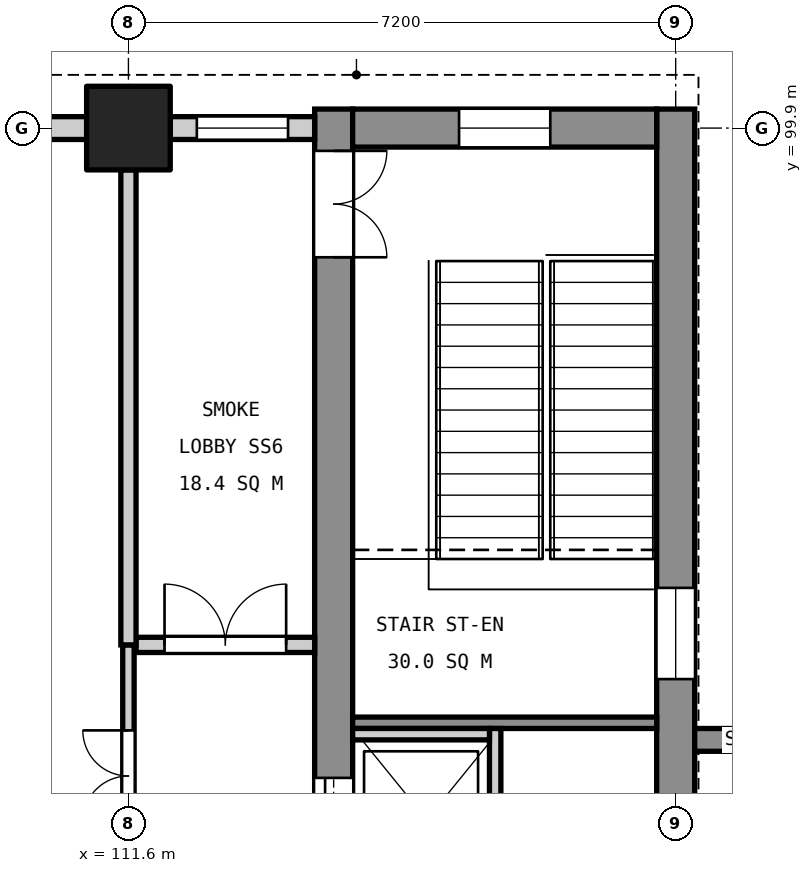
"""IFC4 building model, lengths in metres.
Left out: names, types, materials, properties, quantities, classifications, styles, units other than length and angle.
Written with IfcOpenShell. Run it as: python <this file> out.ifc"""

import sys

from ifc_helpers import new_model, si_unit, direction, frame, frame_2d, origin, origin_2d, place, context, subcontext, project, spatial, rectangle, extrude, element, fill, save


model = new_model("IFC4")
c1 = context("Model", 3, precision=1e-05, world=origin(), true_north=direction((0.0, 1.0)))
c2 = subcontext(c1, "Body", "Model", "MODEL_VIEW")
j1 = project(units=[si_unit("LENGTHUNIT", "METRE"), si_unit("PLANEANGLEUNIT", "RADIAN")], contexts=[c1])
p1 = place(None, origin())
s1 = spatial("IfcSite", under=j1, at=p1, CompositionType="ELEMENT")
p2 = place(p1, origin())
s2 = spatial("IfcBuilding", under=s1, at=p2, CompositionType="ELEMENT")
p3 = place(p2, frame((0.0, 0.0, 16.8)))
s3 = spatial("IfcBuildingStorey", under=s2, at=p3, CompositionType="ELEMENT", Elevation=16.8)
p4 = place(p3, frame((111.6, 99.9, 0.0), z_axis=(0.0, 0.0, 1.0), x_axis=(1.0, 0.0, 0.0)))
e1 = element("IfcColumn", 1, at=p4, inside=s3, PredefinedType="COLUMN", context=c2, shape_type="SweptSolid", body=[
    extrude(rectangle(XDim=1.1, YDim=1.1, at=origin_2d()), origin(), (0.0, 0.0, 1.0), 5.4),
])
p5 = place(p3, frame((118.8, 88.85, 0.0), z_axis=(0.0, 0.0, 1.0), x_axis=(0.0, 1.0, 0.0)))
e2 = element("IfcWall", 2, at=p5, inside=s3, PredefinedType="SHEAR", context=c2, shape_type="SweptSolid", body=[
    extrude(rectangle(XDim=11.3, YDim=0.5, at=frame_2d((5.65, 0.0))), origin(), (0.0, 0.0, 1.0), 5.15),
])
p6 = place(p5, frame((3.8, 0.0, 3.4)))
e3 = element("IfcOpeningElement", 3, at=p6, cuts=e2, PredefinedType="OPENING", context=c2, shape_type="SweptSolid", body=[
    extrude(rectangle(XDim=1.2, YDim=0.9, at=frame_2d((0.6, 0.45))), frame((0.0, 0.26, 0.0), z_axis=(0.0, -1.0, 0.0), x_axis=(1.0, 0.0, 0.0)), (0.0, 0.0, 1.0), 0.52),
])
p7 = place(p3, frame((114.3, 88.85, 0.0), z_axis=(0.0, 0.0, 1.0), x_axis=(0.0, 1.0, 0.0)))
e4 = element("IfcWall", 4, at=p7, inside=s3, PredefinedType="SHEAR", context=c2, shape_type="SweptSolid", body=[
    extrude(rectangle(XDim=11.3, YDim=0.5, at=frame_2d((5.65, 0.0))), origin(), (0.0, 0.0, 1.0), 5.15),
])
p8 = place(p7, frame((9.35, 0.0, 0.0)))
e5 = element("IfcOpeningElement", 5, at=p8, cuts=e4, PredefinedType="OPENING", context=c2, shape_type="SweptSolid", body=[
    extrude(rectangle(XDim=1.4, YDim=2.1, at=frame_2d((0.7, 1.05))), frame((0.0, 0.26, 0.0), z_axis=(0.0, -1.0, 0.0), x_axis=(1.0, 0.0, 0.0)), (0.0, 0.0, 1.0), 0.52),
])
p9 = place(p7, frame((1.4, 0.0, 0.0)))
e6 = element("IfcOpeningElement", 6, at=p9, cuts=e4, PredefinedType="OPENING", context=c2, shape_type="SweptSolid", body=[
    extrude(rectangle(XDim=1.1, YDim=2.1, at=frame_2d((0.55, 1.05))), frame((0.0, 0.26, 0.0), z_axis=(0.0, -1.0, 0.0), x_axis=(1.0, 0.0, 0.0)), (0.0, 0.0, 1.0), 0.52),
])
p10 = place(p3, frame((118.55, 99.9, 0.0), z_axis=(0.0, 0.0, 1.0), x_axis=(-1.0, 0.0, 0.0)))
e7 = element("IfcWall", 7, at=p10, inside=s3, PredefinedType="SHEAR", context=c2, shape_type="SweptSolid", body=[
    extrude(rectangle(XDim=4.0, YDim=0.5, at=frame_2d((2.0, 0.0))), origin(), (0.0, 0.0, 1.0), 5.15),
])
p11 = place(p10, frame((1.4, 0.0, 3.4)))
e8 = element("IfcOpeningElement", 8, at=p11, cuts=e7, PredefinedType="OPENING", context=c2, shape_type="SweptSolid", body=[
    extrude(rectangle(XDim=1.2, YDim=0.9, at=frame_2d((0.6, 0.45))), frame((0.0, 0.26, 0.0), z_axis=(0.0, -1.0, 0.0), x_axis=(1.0, 0.0, 0.0)), (0.0, 0.0, 1.0), 0.52),
])
p12 = place(p3, frame((119.05, 91.85, 0.0), z_axis=(0.0, 0.0, 1.0), x_axis=(1.0, 0.0, 0.0)))
e9 = element("IfcWall", 9, at=p12, inside=s3, PredefinedType="SHEAR", context=c2, shape_type="SweptSolid", body=[
    extrude(rectangle(XDim=1.25, YDim=0.3, at=frame_2d((0.625, 0.0))), origin(), (0.0, 0.0, 1.0), 5.4),
])
p13 = place(p3, frame((118.55, 92.075, 0.0), z_axis=(0.0, 0.0, 1.0), x_axis=(-1.0, 0.0, 0.0)))
e10 = element("IfcWall", 10, at=p13, inside=s3, PredefinedType="SOLIDWALL", context=c2, shape_type="SweptSolid", body=[
    extrude(rectangle(XDim=4.0, YDim=0.15, at=frame_2d((2.0, 0.0))), origin(), (0.0, 0.0, 1.0), 5.15),
])
p14 = place(p3, frame((116.425, 92.0, 0.0), z_axis=(0.0, 0.0, 1.0), x_axis=(0.0, -1.0, 0.0)))
e11 = element("IfcWall", 11, at=p14, inside=s3, PredefinedType="SOLIDWALL", context=c2, shape_type="SweptSolid", body=[
    extrude(rectangle(XDim=2.65, YDim=0.15, at=frame_2d((1.325, 0.0))), origin(), (0.0, 0.0, 1.0), 5.4),
])
p15 = place(p3, frame((116.35, 91.925, 0.0), z_axis=(0.0, 0.0, 1.0), x_axis=(-1.0, 0.0, 0.0)))
e12 = element("IfcWall", 12, at=p15, inside=s3, PredefinedType="SOLIDWALL", context=c2, shape_type="SweptSolid", body=[
    extrude(rectangle(XDim=1.8, YDim=0.15, at=frame_2d((0.9, 0.0))), origin(), (0.0, 0.0, 1.0), 5.4),
])
p16 = place(p3, frame((114.05, 99.9, 0.0), z_axis=(0.0, 0.0, 1.0), x_axis=(-1.0, 0.0, 0.0)))
e13 = element("IfcWall", 13, at=p16, inside=s3, PredefinedType="STANDARD", context=c2, shape_type="SweptSolid", body=[
    extrude(rectangle(XDim=1.9, YDim=0.3, at=frame_2d((0.95, 0.0))), origin(), (0.0, 0.0, 1.0), 4.45),
])
p17 = place(p16, frame((0.35, 0.0, 0.9)))
e14 = element("IfcOpeningElement", 14, at=p17, cuts=e13, PredefinedType="OPENING", context=c2, shape_type="SweptSolid", body=[
    extrude(rectangle(XDim=1.2, YDim=2.4, at=frame_2d((0.6, 1.2))), frame((0.0, 0.16, 0.0), z_axis=(0.0, -1.0, 0.0), x_axis=(1.0, 0.0, 0.0)), (0.0, 0.0, 1.0), 0.32),
])
p18 = place(p3, frame((111.05, 99.9, 0.0), z_axis=(0.0, 0.0, 1.0), x_axis=(-1.0, 0.0, 0.0)))
e15 = element("IfcWall", 15, at=p18, inside=s3, PredefinedType="STANDARD", context=c2, shape_type="SweptSolid", body=[
    extrude(rectangle(XDim=9.7, YDim=0.3, at=frame_2d((4.85, 0.0))), origin(), (0.0, 0.0, 1.0), 4.45),
])
p19 = place(p18, frame((0.625, 0.0, 0.9)))
e16 = element("IfcOpeningElement", 16, at=p19, cuts=e15, PredefinedType="OPENING", context=c2, shape_type="SweptSolid", body=[
    extrude(rectangle(XDim=1.8, YDim=3.0, at=frame_2d((0.9, 1.5))), frame((0.0, 0.16, 0.0), z_axis=(0.0, -1.0, 0.0), x_axis=(1.0, 0.0, 0.0)), (0.0, 0.0, 1.0), 0.32),
])
p20 = place(p18, frame((4.475, 0.0, 0.8)))
e17 = element("IfcOpeningElement", 17, at=p20, cuts=e15, PredefinedType="OPENING", context=c2, shape_type="SweptSolid", body=[
    extrude(rectangle(XDim=0.75, YDim=1.2, at=frame_2d((0.375, 0.6))), frame((0.0, 0.16, 0.0), z_axis=(0.0, -1.0, 0.0), x_axis=(1.0, 0.0, 0.0)), (0.0, 0.0, 1.0), 0.32),
])
p21 = place(p18, frame((7.275, 0.0, 0.9)))
e18 = element("IfcOpeningElement", 18, at=p21, cuts=e15, PredefinedType="OPENING", context=c2, shape_type="SweptSolid", body=[
    extrude(rectangle(XDim=1.8, YDim=3.0, at=frame_2d((0.9, 1.5))), frame((0.0, 0.16, 0.0), z_axis=(0.0, -1.0, 0.0), x_axis=(1.0, 0.0, 0.0)), (0.0, 0.0, 1.0), 0.32),
])
p22 = place(p3, frame((114.05, 93.1, 0.0), z_axis=(0.0, 0.0, 1.0), x_axis=(-1.0, 0.0, 0.0)))
e19 = element("IfcWall", 19, at=p22, inside=s3, PredefinedType="PARTITIONING", context=c2, shape_type="SweptSolid", body=[
    extrude(rectangle(XDim=2.35, YDim=0.2, at=frame_2d((1.175, 0.0))), origin(), (0.0, 0.0, 1.0), 4.05),
])
p23 = place(p22, frame((0.375, 0.0, 0.0)))
e20 = element("IfcOpeningElement", 20, at=p23, cuts=e19, PredefinedType="OPENING", context=c2, shape_type="SweptSolid", body=[
    extrude(rectangle(XDim=1.6, YDim=2.1, at=frame_2d((0.8, 1.05))), frame((0.0, 0.11, 0.0), z_axis=(0.0, -1.0, 0.0), x_axis=(1.0, 0.0, 0.0)), (0.0, 0.0, 1.0), 0.22),
])
p24 = place(p3, frame((111.6, 89.65, 0.0), z_axis=(0.0, 0.0, 1.0), x_axis=(0.0, 1.0, 0.0)))
e21 = element("IfcWall", 21, at=p24, inside=s3, PredefinedType="PARTITIONING", context=c2, shape_type="SweptSolid", body=[
    extrude(rectangle(XDim=3.45, YDim=0.15, at=frame_2d((1.725, 0.0))), origin(), (0.0, 0.0, 1.0), 4.15),
])
p25 = place(p24, frame((1.125, 0.0, 0.0)))
e22 = element("IfcOpeningElement", 22, at=p25, cuts=e21, PredefinedType="OPENING", context=c2, shape_type="SweptSolid", body=[
    extrude(rectangle(XDim=1.2, YDim=2.1, at=frame_2d((0.6, 1.05))), frame((0.0, 0.085, 0.0), z_axis=(0.0, -1.0, 0.0), x_axis=(1.0, 0.0, 0.0)), (0.0, 0.0, 1.0), 0.17),
])
p26 = place(p3, frame((111.6, 93.1, 0.0), z_axis=(0.0, 0.0, 1.0), x_axis=(0.0, 1.0, 0.0)))
e23 = element("IfcWall", 23, at=p26, inside=s3, PredefinedType="PARTITIONING", context=c2, shape_type="SweptSolid", body=[
    extrude(rectangle(XDim=6.25, YDim=0.2, at=frame_2d((3.125, 0.0))), origin(), (0.0, 0.0, 1.0), 4.15),
])
p27 = place(p8, frame((1.4, 0.0, 0.0), z_axis=(0.0, 0.0, 1.0), x_axis=(-1.0, 0.0, 0.0)))
e24 = element("IfcDoor", 24, at=p27, inside=s3, OperationType="DOUBLE_DOOR_SINGLE_SWING", PredefinedType="DOOR", context=c2, shape_type="SweptSolid", body=[
    extrude(rectangle(XDim=1.4, YDim=2.1, at=frame_2d((0.7, 1.05))), frame((0.0, 0.025, 0.0), z_axis=(0.0, -1.0, 0.0), x_axis=(1.0, 0.0, 0.0)), (0.0, 0.0, 1.0), 0.05),
])
fill(e5, e24)
p28 = place(p9, origin())
e25 = element("IfcDoor", 25, at=p28, inside=s3, OperationType="SLIDING_TO_LEFT", PredefinedType="DOOR", context=c2, shape_type="SweptSolid", body=[
    extrude(rectangle(XDim=1.1, YDim=2.1, at=frame_2d((0.55, 1.05))), frame((0.0, 0.025, 0.0), z_axis=(0.0, -1.0, 0.0), x_axis=(1.0, 0.0, 0.0)), (0.0, 0.0, 1.0), 0.05),
])
fill(e6, e25)
p29 = place(p17, origin())
e26 = element("IfcWindow", 26, at=p29, inside=s3, PartitioningType="SINGLE_PANEL", PredefinedType="WINDOW", context=c2, shape_type="SweptSolid", body=[
    extrude(rectangle(XDim=1.2, YDim=2.4, at=frame_2d((0.6, 1.2))), frame((0.0, 0.03, 0.0), z_axis=(0.0, -1.0, 0.0), x_axis=(1.0, 0.0, 0.0)), (0.0, 0.0, 1.0), 0.06),
])
fill(e14, e26)
p30 = place(p6, origin())
e27 = element("IfcWindow", 27, at=p30, inside=s3, PartitioningType="SINGLE_PANEL", PredefinedType="WINDOW", context=c2, shape_type="SweptSolid", body=[
    extrude(rectangle(XDim=1.2, YDim=0.9, at=frame_2d((0.6, 0.45))), frame((0.0, 0.03, 0.0), z_axis=(0.0, -1.0, 0.0), x_axis=(1.0, 0.0, 0.0)), (0.0, 0.0, 1.0), 0.06),
])
fill(e3, e27)
p31 = place(p11, origin())
e28 = element("IfcWindow", 28, at=p31, inside=s3, PartitioningType="SINGLE_PANEL", PredefinedType="WINDOW", context=c2, shape_type="SweptSolid", body=[
    extrude(rectangle(XDim=1.2, YDim=0.9, at=frame_2d((0.6, 0.45))), frame((0.0, 0.03, 0.0), z_axis=(0.0, -1.0, 0.0), x_axis=(1.0, 0.0, 0.0)), (0.0, 0.0, 1.0), 0.06),
])
fill(e8, e28)
p32 = place(p25, origin())
e29 = element("IfcDoor", 29, at=p32, inside=s3, OperationType="DOUBLE_DOOR_SINGLE_SWING", PredefinedType="DOOR", context=c2, shape_type="SweptSolid", body=[
    extrude(rectangle(XDim=1.2, YDim=2.1, at=frame_2d((0.6, 1.05))), frame((0.0, 0.025, 0.0), z_axis=(0.0, -1.0, 0.0), x_axis=(1.0, 0.0, 0.0)), (0.0, 0.0, 1.0), 0.05),
])
fill(e22, e29)
p33 = place(p23, frame((1.6, 0.0, 0.0), z_axis=(0.0, 0.0, 1.0), x_axis=(-1.0, 0.0, 0.0)))
e30 = element("IfcDoor", 30, at=p33, inside=s3, OperationType="DOUBLE_DOOR_SINGLE_SWING", PredefinedType="DOOR", context=c2, shape_type="SweptSolid", body=[
    extrude(rectangle(XDim=1.6, YDim=2.1, at=frame_2d((0.8, 1.05))), frame((0.0, 0.025, 0.0), z_axis=(0.0, -1.0, 0.0), x_axis=(1.0, 0.0, 0.0)), (0.0, 0.0, 1.0), 0.05),
])
fill(e20, e30)
save(model, sys.argv[1])
